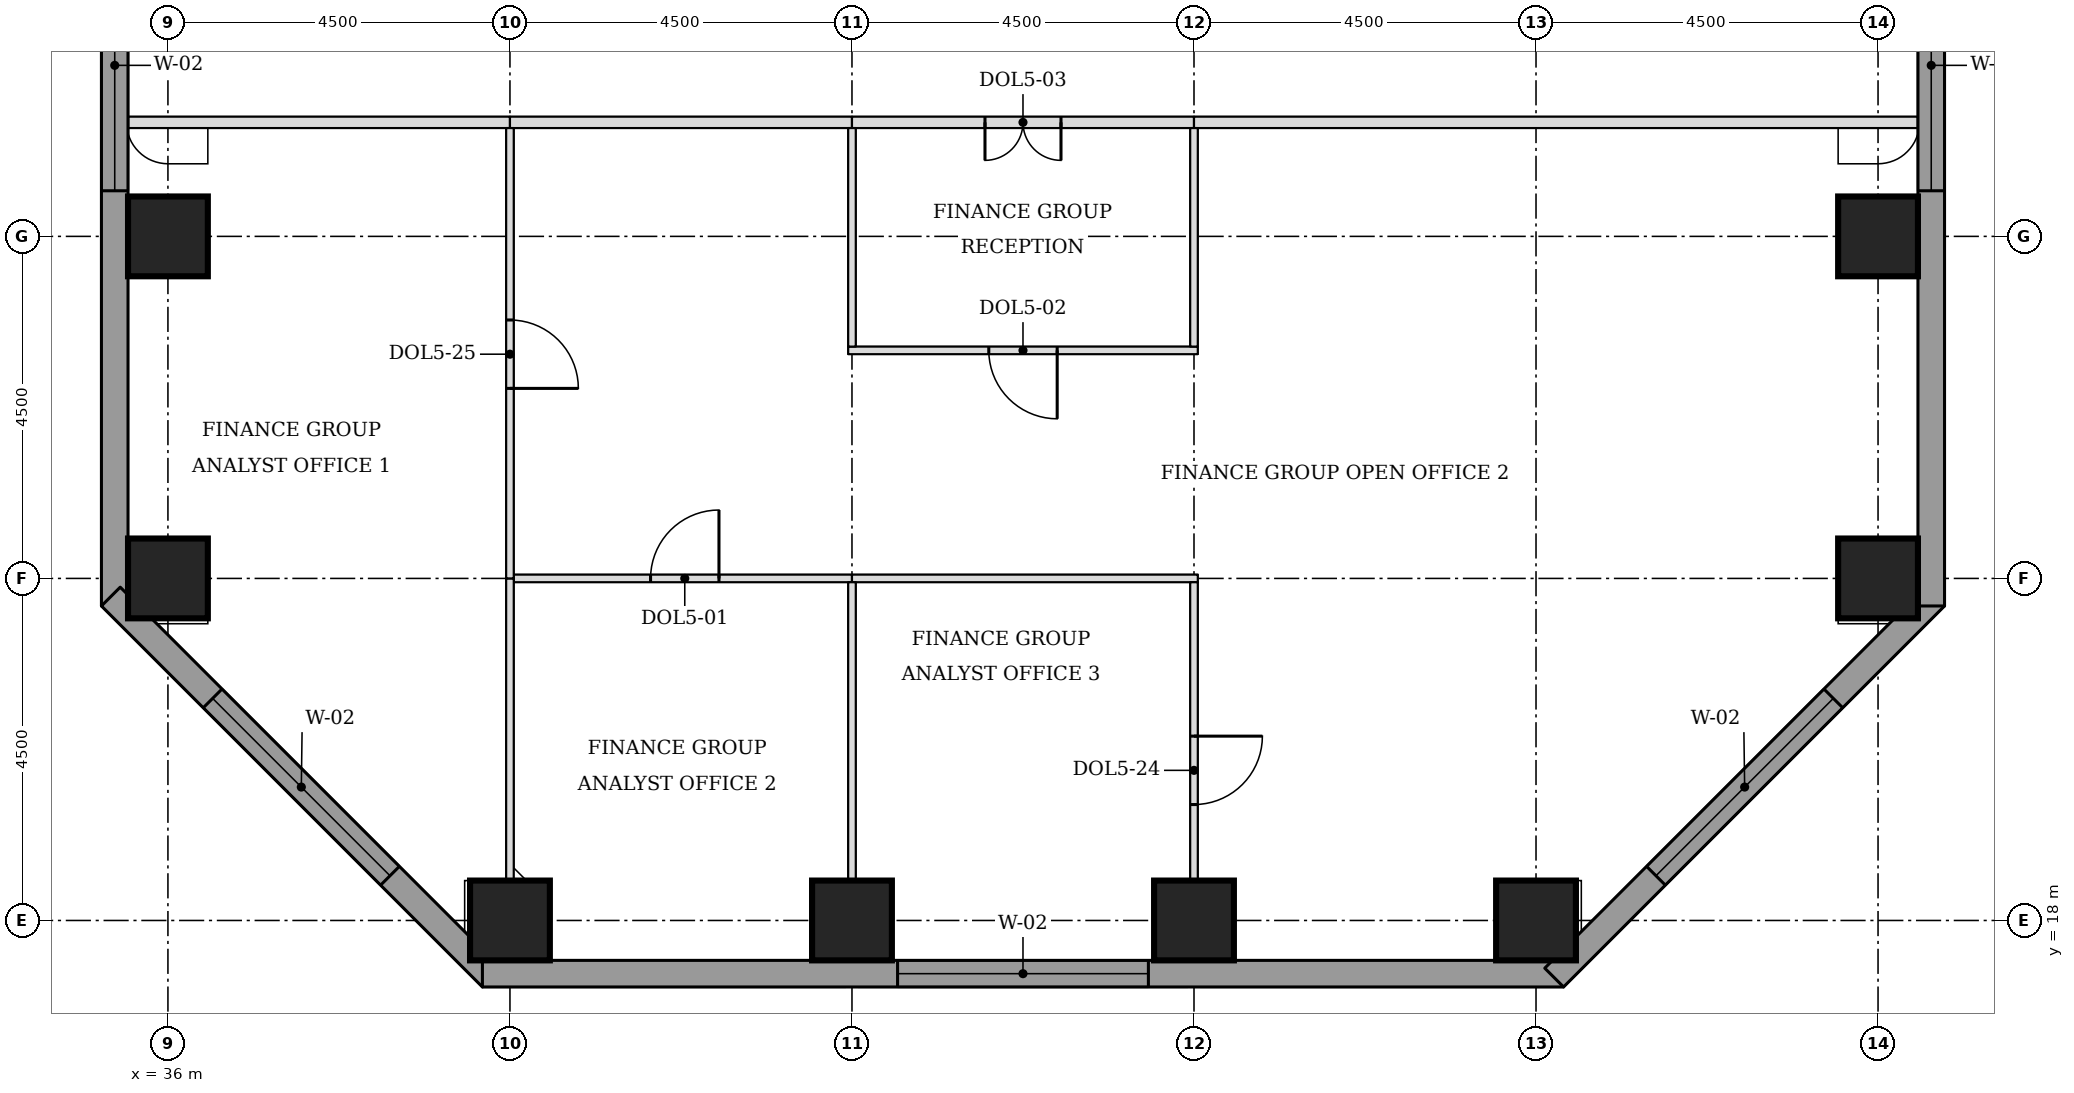
"""IFC4 building model, lengths in metres.
Left out: names, types, materials, properties, quantities, classifications, styles, units other than length and angle.
Written with IfcOpenShell. Run it as: python <this file> out.ifc"""

import sys

from ifc_helpers import new_model, si_unit, direction, frame, frame_2d, origin, origin_2d, place, context, subcontext, project, spatial, rectangle, extrude, element, fill, save


model = new_model("IFC4")
c1 = context("Model", 3, precision=1e-05, world=origin(), true_north=direction((0.0, 1.0)))
c2 = subcontext(c1, "Body", "Model", "MODEL_VIEW")
j1 = project(units=[si_unit("LENGTHUNIT", "METRE"), si_unit("PLANEANGLEUNIT", "RADIAN")], contexts=[c1])
p1 = place(None, origin())
s1 = spatial("IfcSite", under=j1, at=p1, CompositionType="ELEMENT")
p2 = place(p1, origin())
s2 = spatial("IfcBuilding", under=s1, at=p2, CompositionType="ELEMENT")
p3 = place(p2, frame((0.0, 0.0, 112.2)))
s3 = spatial("IfcBuildingStorey", under=s2, at=p3, CompositionType="ELEMENT", Elevation=112.2)
for number, where, z_axis, x_axis in (
    (1, (40.5, 18.0, 0.0), (0.0, 0.0, 1.0), (1.0, 0.0, 0.0)),
    (2, (45.0, 18.0, 0.0), (0.0, 0.0, 1.0), (1.0, 0.0, 0.0)),
    (3, (49.5, 18.0, 0.0), (0.0, 0.0, 1.0), (1.0, 0.0, 0.0)),
    (4, (54.0, 18.0, 0.0), (0.0, 0.0, 1.0), (1.0, 0.0, 0.0)),
    (5, (36.0, 22.5, 0.0), (0.0, 0.0, 1.0), (1.0, 0.0, 0.0)),
    (6, (58.5, 22.5, 0.0), (0.0, 0.0, 1.0), (1.0, 0.0, 0.0)),
    (7, (36.0, 27.0, 0.0), (0.0, 0.0, 1.0), (1.0, 0.0, 0.0)),
    (8, (58.5, 27.0, 0.0), (0.0, 0.0, 1.0), (1.0, 0.0, 0.0)),
):
    element("IfcColumn", number, at=place(p3, frame(where, z_axis=z_axis, x_axis=x_axis)), inside=s3, PredefinedType="COLUMN", context=c2, shape_type="SweptSolid", body=[
        extrude(rectangle(XDim=1.05, YDim=1.05, at=origin_2d()), origin(), (0.0, 0.0, 1.0), 3.7),
    ])
p4 = place(p3, frame((35.3, 39.975, 0.0), z_axis=(0.0, 0.0, 1.0), x_axis=(0.0, -1.0, 0.0)))
e9 = element("IfcWall", 9, at=p4, inside=s3, PredefinedType="STANDARD", context=c2, shape_type="SweptSolid", body=[
    extrude(rectangle(XDim=17.837, YDim=0.35, at=frame_2d((8.919, 0.0))), origin(), (0.0, 0.0, 1.0), 3.525),
])
p5 = place(p4, frame((0.5, 0.0, 0.9)))
e10 = element("IfcOpeningElement", 10, at=p5, cuts=e9, PredefinedType="OPENING", context=c2, shape_type="SweptSolid", body=[
    extrude(rectangle(XDim=3.3, YDim=1.9, at=frame_2d((1.65, 0.95))), frame((0.0, 0.185, 0.0), z_axis=(0.0, -1.0, 0.0), x_axis=(1.0, 0.0, 0.0)), (0.0, 0.0, 1.0), 0.37),
])
p6 = place(p4, frame((9.075, 0.0, 0.9)))
e11 = element("IfcOpeningElement", 11, at=p6, cuts=e9, PredefinedType="OPENING", context=c2, shape_type="SweptSolid", body=[
    extrude(rectangle(XDim=3.3, YDim=1.9, at=frame_2d((1.65, 0.95))), frame((0.0, 0.185, 0.0), z_axis=(0.0, -1.0, 0.0), x_axis=(1.0, 0.0, 0.0)), (0.0, 0.0, 1.0), 0.37),
])
p7 = place(p3, frame((35.249, 22.261, 0.0), z_axis=(0.0, 0.0, 1.0), x_axis=(0.707106781187, -0.707106781187, 0.0)))
e12 = element("IfcWall", 12, at=p7, inside=s3, PredefinedType="STANDARD", context=c2, shape_type="SweptSolid", body=[
    extrude(rectangle(XDim=7.089, YDim=0.35, at=frame_2d((3.544, 0.0))), origin(), (0.0, 0.0, 1.0), 3.525),
])
p8 = place(p7, frame((1.894, 0.0, 0.9)))
e13 = element("IfcOpeningElement", 13, at=p8, cuts=e12, PredefinedType="OPENING", context=c2, shape_type="SweptSolid", body=[
    extrude(rectangle(XDim=3.3, YDim=1.9, at=frame_2d((1.65, 0.95))), frame((0.0, 0.185, 0.0), z_axis=(0.0, -1.0, 0.0), x_axis=(1.0, 0.0, 0.0)), (0.0, 0.0, 1.0), 0.37),
])
p9 = place(p3, frame((40.138, 17.3, 0.0), z_axis=(0.0, 0.0, 1.0), x_axis=(1.0, 0.0, 0.0)))
e14 = element("IfcWall", 14, at=p9, inside=s3, PredefinedType="STANDARD", context=c2, shape_type="SweptSolid", body=[
    extrude(rectangle(XDim=14.225, YDim=0.35, at=frame_2d((7.112, 0.0))), origin(), (0.0, 0.0, 1.0), 3.525),
])
p10 = place(p9, frame((5.462, 0.0, 0.9)))
e15 = element("IfcOpeningElement", 15, at=p10, cuts=e14, PredefinedType="OPENING", context=c2, shape_type="SweptSolid", body=[
    extrude(rectangle(XDim=3.3, YDim=1.9, at=frame_2d((1.65, 0.95))), frame((0.0, 0.185, 0.0), z_axis=(0.0, -1.0, 0.0), x_axis=(1.0, 0.0, 0.0)), (0.0, 0.0, 1.0), 0.37),
])
p11 = place(p3, frame((54.239, 17.249, 0.0), z_axis=(0.0, 0.0, 1.0), x_axis=(0.707106781187, 0.707106781187, 0.0)))
e16 = element("IfcWall", 16, at=p11, inside=s3, PredefinedType="STANDARD", context=c2, shape_type="SweptSolid", body=[
    extrude(rectangle(XDim=7.089, YDim=0.35, at=frame_2d((3.544, 0.0))), origin(), (0.0, 0.0, 1.0), 3.525),
])
p12 = place(p11, frame((1.894, 0.0, 0.9)))
e17 = element("IfcOpeningElement", 17, at=p12, cuts=e16, PredefinedType="OPENING", context=c2, shape_type="SweptSolid", body=[
    extrude(rectangle(XDim=3.3, YDim=1.9, at=frame_2d((1.65, 0.95))), frame((0.0, 0.185, 0.0), z_axis=(0.0, -1.0, 0.0), x_axis=(1.0, 0.0, 0.0)), (0.0, 0.0, 1.0), 0.37),
])
p13 = place(p3, frame((59.2, 22.138, 0.0), z_axis=(0.0, 0.0, 1.0), x_axis=(0.0, 1.0, 0.0)))
e18 = element("IfcWall", 18, at=p13, inside=s3, PredefinedType="STANDARD", context=c2, shape_type="SweptSolid", body=[
    extrude(rectangle(XDim=17.837, YDim=0.35, at=frame_2d((8.919, 0.0))), origin(), (0.0, 0.0, 1.0), 3.525),
])
p14 = place(p13, frame((5.462, 0.0, 0.9)))
e19 = element("IfcOpeningElement", 19, at=p14, cuts=e18, PredefinedType="OPENING", context=c2, shape_type="SweptSolid", body=[
    extrude(rectangle(XDim=3.3, YDim=1.9, at=frame_2d((1.65, 0.95))), frame((0.0, 0.185, 0.0), z_axis=(0.0, -1.0, 0.0), x_axis=(1.0, 0.0, 0.0)), (0.0, 0.0, 1.0), 0.37),
])
p15 = place(p13, frame((14.037, 0.0, 0.9)))
e20 = element("IfcOpeningElement", 20, at=p15, cuts=e18, PredefinedType="OPENING", context=c2, shape_type="SweptSolid", body=[
    extrude(rectangle(XDim=3.3, YDim=1.9, at=frame_2d((1.65, 0.95))), frame((0.0, 0.185, 0.0), z_axis=(0.0, -1.0, 0.0), x_axis=(1.0, 0.0, 0.0)), (0.0, 0.0, 1.0), 0.37),
])
p16 = place(p3, frame((40.55, 22.5, 0.0), z_axis=(0.0, 0.0, 1.0), x_axis=(1.0, 0.0, 0.0)))
e21 = element("IfcWall", 21, at=p16, inside=s3, PredefinedType="PARTITIONING", context=c2, shape_type="SweptSolid", body=[
    extrude(rectangle(XDim=4.45, YDim=0.1, at=frame_2d((2.225, 0.0))), origin(), (0.0, 0.0, 1.0), 2.55),
])
p17 = place(p16, frame((1.8, 0.0, 0.0)))
e22 = element("IfcOpeningElement", 22, at=p17, cuts=e21, PredefinedType="OPENING", context=c2, shape_type="SweptSolid", body=[
    extrude(rectangle(XDim=0.9, YDim=2.1, at=frame_2d((0.45, 1.05))), frame((0.0, 0.06, 0.0), z_axis=(0.0, -1.0, 0.0), x_axis=(1.0, 0.0, 0.0)), (0.0, 0.0, 1.0), 0.12),
])
p18 = place(p3, frame((45.0, 22.5, 0.0), z_axis=(0.0, 0.0, 1.0), x_axis=(1.0, 0.0, 0.0)))
e23 = element("IfcWall", 23, at=p18, inside=s3, PredefinedType="PARTITIONING", context=c2, shape_type="SweptSolid", body=[
    extrude(rectangle(XDim=4.55, YDim=0.1, at=frame_2d((2.275, 0.0))), origin(), (0.0, 0.0, 1.0), 2.55),
])
p19 = place(p3, frame((44.95, 25.5, 0.0), z_axis=(0.0, 0.0, 1.0), x_axis=(1.0, 0.0, 0.0)))
e24 = element("IfcWall", 24, at=p19, inside=s3, PredefinedType="PARTITIONING", context=c2, shape_type="SweptSolid", body=[
    extrude(rectangle(XDim=4.6, YDim=0.1, at=frame_2d((2.3, 0.0))), origin(), (0.0, 0.0, 1.0), 3.55),
])
p20 = place(p19, frame((1.85, 0.0, 0.0)))
e25 = element("IfcOpeningElement", 25, at=p20, cuts=e24, PredefinedType="OPENING", context=c2, shape_type="SweptSolid", body=[
    extrude(rectangle(XDim=0.9, YDim=2.1, at=frame_2d((0.45, 1.05))), frame((0.0, 0.06, 0.0), z_axis=(0.0, -1.0, 0.0), x_axis=(1.0, 0.0, 0.0)), (0.0, 0.0, 1.0), 0.12),
])
p21 = place(p3, frame((35.475, 28.5, 0.0), z_axis=(0.0, 0.0, 1.0), x_axis=(1.0, 0.0, 0.0)))
e26 = element("IfcWall", 26, at=p21, inside=s3, PredefinedType="PARTITIONING", context=c2, shape_type="SweptSolid", body=[
    extrude(rectangle(XDim=5.025, YDim=0.15, at=frame_2d((2.512, 0.0))), origin(), (0.0, 0.0, 1.0), 3.55),
])
p22 = place(p3, frame((40.5, 28.5, 0.0), z_axis=(0.0, 0.0, 1.0), x_axis=(1.0, 0.0, 0.0)))
e27 = element("IfcWall", 27, at=p22, inside=s3, PredefinedType="PARTITIONING", context=c2, shape_type="SweptSolid", body=[
    extrude(rectangle(XDim=4.5, YDim=0.15, at=frame_2d((2.25, 0.0))), origin(), (0.0, 0.0, 1.0), 3.55),
])
p23 = place(p3, frame((45.0, 28.5, 0.0), z_axis=(0.0, 0.0, 1.0), x_axis=(1.0, 0.0, 0.0)))
e28 = element("IfcWall", 28, at=p23, inside=s3, PredefinedType="PARTITIONING", context=c2, shape_type="SweptSolid", body=[
    extrude(rectangle(XDim=4.5, YDim=0.15, at=frame_2d((2.25, 0.0))), origin(), (0.0, 0.0, 1.0), 3.55),
])
p24 = place(p23, frame((1.75, 0.0, 0.0)))
e29 = element("IfcOpeningElement", 29, at=p24, cuts=e28, PredefinedType="OPENING", context=c2, shape_type="SweptSolid", body=[
    extrude(rectangle(XDim=1.0, YDim=2.1, at=frame_2d((0.5, 1.05))), frame((0.0, 0.085, 0.0), z_axis=(0.0, -1.0, 0.0), x_axis=(1.0, 0.0, 0.0)), (0.0, 0.0, 1.0), 0.17),
])
p25 = place(p3, frame((49.5, 28.5, 0.0), z_axis=(0.0, 0.0, 1.0), x_axis=(1.0, 0.0, 0.0)))
e30 = element("IfcWall", 30, at=p25, inside=s3, PredefinedType="PARTITIONING", context=c2, shape_type="SweptSolid", body=[
    extrude(rectangle(XDim=9.525, YDim=0.15, at=frame_2d((4.762, 0.0))), origin(), (0.0, 0.0, 1.0), 3.55),
])
p26 = place(p3, frame((45.0, 17.475, 0.0), z_axis=(0.0, 0.0, 1.0), x_axis=(0.0, 1.0, 0.0)))
e31 = element("IfcWall", 31, at=p26, inside=s3, PredefinedType="PARTITIONING", context=c2, shape_type="SweptSolid", body=[
    extrude(rectangle(XDim=4.975, YDim=0.1, at=frame_2d((2.487, 0.0))), origin(), (0.0, 0.0, 1.0), 3.55),
])
p27 = place(p3, frame((49.5, 17.475, 0.0), z_axis=(0.0, 0.0, 1.0), x_axis=(0.0, 1.0, 0.0)))
e32 = element("IfcWall", 32, at=p27, inside=s3, PredefinedType="PARTITIONING", context=c2, shape_type="SweptSolid", body=[
    extrude(rectangle(XDim=4.975, YDim=0.1, at=frame_2d((2.487, 0.0))), origin(), (0.0, 0.0, 1.0), 3.55),
])
p28 = place(p27, frame((2.05, 0.0, 0.0)))
e33 = element("IfcOpeningElement", 33, at=p28, cuts=e32, PredefinedType="OPENING", context=c2, shape_type="SweptSolid", body=[
    extrude(rectangle(XDim=0.9, YDim=2.1, at=frame_2d((0.45, 1.05))), frame((0.0, 0.06, 0.0), z_axis=(0.0, -1.0, 0.0), x_axis=(1.0, 0.0, 0.0)), (0.0, 0.0, 1.0), 0.12),
])
p29 = place(p3, frame((40.5, 18.525, 0.0), z_axis=(0.0, 0.0, 1.0), x_axis=(0.0, 1.0, 0.0)))
e34 = element("IfcWall", 34, at=p29, inside=s3, PredefinedType="PARTITIONING", context=c2, shape_type="SweptSolid", body=[
    extrude(rectangle(XDim=3.975, YDim=0.1, at=frame_2d((1.988, 0.0))), origin(), (0.0, 0.0, 1.0), 3.55),
])
p30 = place(p3, frame((40.5, 22.5, 0.0), z_axis=(0.0, 0.0, 1.0), x_axis=(0.0, 1.0, 0.0)))
e35 = element("IfcWall", 35, at=p30, inside=s3, PredefinedType="PARTITIONING", context=c2, shape_type="SweptSolid", body=[
    extrude(rectangle(XDim=5.925, YDim=0.1, at=frame_2d((2.962, 0.0))), origin(), (0.0, 0.0, 1.0), 3.55),
])
p31 = place(p30, frame((2.5, 0.0, 0.0)))
e36 = element("IfcOpeningElement", 36, at=p31, cuts=e35, PredefinedType="OPENING", context=c2, shape_type="SweptSolid", body=[
    extrude(rectangle(XDim=0.9, YDim=2.1, at=frame_2d((0.45, 1.05))), frame((0.0, 0.06, 0.0), z_axis=(0.0, -1.0, 0.0), x_axis=(1.0, 0.0, 0.0)), (0.0, 0.0, 1.0), 0.12),
])
for number, where, z_axis, x_axis in (
    (37, (45.0, 25.55, 0.0), (0.0, 0.0, 1.0), (0.0, 1.0, 0.0)),
    (38, (49.5, 25.55, 0.0), (0.0, 0.0, 1.0), (0.0, 1.0, 0.0)),
):
    element("IfcWall", number, at=place(p3, frame(where, z_axis=z_axis, x_axis=x_axis)), inside=s3, PredefinedType="PARTITIONING", context=c2, shape_type="SweptSolid", body=[
        extrude(rectangle(XDim=2.875, YDim=0.1, at=frame_2d((1.438, 0.0))), origin(), (0.0, 0.0, 1.0), 3.55),
    ])
p32 = place(p6, origin())
e39 = element("IfcWindow", 39, at=p32, inside=s3, PartitioningType="SINGLE_PANEL", PredefinedType="WINDOW", context=c2, shape_type="SweptSolid", body=[
    extrude(rectangle(XDim=3.3, YDim=1.9, at=frame_2d((1.65, 0.95))), frame((0.0, 0.085, 0.0), z_axis=(0.0, -1.0, 0.0), x_axis=(1.0, 0.0, 0.0)), (0.0, 0.0, 1.0), 0.06),
])
fill(e11, e39)
p33 = place(p8, origin())
e40 = element("IfcWindow", 40, at=p33, inside=s3, PartitioningType="SINGLE_PANEL", PredefinedType="WINDOW", context=c2, shape_type="SweptSolid", body=[
    extrude(rectangle(XDim=3.3, YDim=1.9, at=frame_2d((1.65, 0.95))), frame((0.0, 0.085, 0.0), z_axis=(0.0, -1.0, 0.0), x_axis=(1.0, 0.0, 0.0)), (0.0, 0.0, 1.0), 0.06),
])
fill(e13, e40)
p34 = place(p10, origin())
e41 = element("IfcWindow", 41, at=p34, inside=s3, PartitioningType="SINGLE_PANEL", PredefinedType="WINDOW", context=c2, shape_type="SweptSolid", body=[
    extrude(rectangle(XDim=3.3, YDim=1.9, at=frame_2d((1.65, 0.95))), frame((0.0, 0.085, 0.0), z_axis=(0.0, -1.0, 0.0), x_axis=(1.0, 0.0, 0.0)), (0.0, 0.0, 1.0), 0.06),
])
fill(e15, e41)
p35 = place(p12, origin())
e42 = element("IfcWindow", 42, at=p35, inside=s3, PartitioningType="SINGLE_PANEL", PredefinedType="WINDOW", context=c2, shape_type="SweptSolid", body=[
    extrude(rectangle(XDim=3.3, YDim=1.9, at=frame_2d((1.65, 0.95))), frame((0.0, 0.085, 0.0), z_axis=(0.0, -1.0, 0.0), x_axis=(1.0, 0.0, 0.0)), (0.0, 0.0, 1.0), 0.06),
])
fill(e17, e42)
p36 = place(p14, origin())
e43 = element("IfcWindow", 43, at=p36, inside=s3, PartitioningType="SINGLE_PANEL", PredefinedType="WINDOW", context=c2, shape_type="SweptSolid", body=[
    extrude(rectangle(XDim=3.3, YDim=1.9, at=frame_2d((1.65, 0.95))), frame((0.0, 0.085, 0.0), z_axis=(0.0, -1.0, 0.0), x_axis=(1.0, 0.0, 0.0)), (0.0, 0.0, 1.0), 0.06),
])
fill(e19, e43)
p37 = place(p24, frame((1.0, 0.0, 0.0), z_axis=(0.0, 0.0, 1.0), x_axis=(-1.0, 0.0, 0.0)))
e44 = element("IfcDoor", 44, at=p37, inside=s3, OperationType="DOUBLE_DOOR_SINGLE_SWING", PredefinedType="DOOR", context=c2, shape_type="SweptSolid", body=[
    extrude(rectangle(XDim=1.0, YDim=2.1, at=frame_2d((0.5, 1.05))), frame((0.0, 0.025, 0.0), z_axis=(0.0, -1.0, 0.0), x_axis=(1.0, 0.0, 0.0)), (0.0, 0.0, 1.0), 0.05),
])
fill(e29, e44)
p38 = place(p20, frame((0.9, 0.0, 0.0), z_axis=(0.0, 0.0, 1.0), x_axis=(-1.0, 0.0, 0.0)))
e45 = element("IfcDoor", 45, at=p38, inside=s3, OperationType="SINGLE_SWING_LEFT", PredefinedType="DOOR", context=c2, shape_type="SweptSolid", body=[
    extrude(rectangle(XDim=0.9, YDim=2.1, at=frame_2d((0.45, 1.05))), frame((0.0, 0.025, 0.0), z_axis=(0.0, -1.0, 0.0), x_axis=(1.0, 0.0, 0.0)), (0.0, 0.0, 1.0), 0.05),
])
fill(e25, e45)
p39 = place(p31, frame((0.9, 0.0, 0.0), z_axis=(0.0, 0.0, 1.0), x_axis=(-1.0, 0.0, 0.0)))
e46 = element("IfcDoor", 46, at=p39, inside=s3, OperationType="SINGLE_SWING_RIGHT", PredefinedType="DOOR", context=c2, shape_type="SweptSolid", body=[
    extrude(rectangle(XDim=0.9, YDim=2.1, at=frame_2d((0.45, 1.05))), frame((0.0, 0.025, 0.0), z_axis=(0.0, -1.0, 0.0), x_axis=(1.0, 0.0, 0.0)), (0.0, 0.0, 1.0), 0.05),
])
fill(e36, e46)
p40 = place(p17, origin())
e47 = element("IfcDoor", 47, at=p40, inside=s3, OperationType="SINGLE_SWING_RIGHT", PredefinedType="DOOR", context=c2, shape_type="SweptSolid", body=[
    extrude(rectangle(XDim=0.9, YDim=2.1, at=frame_2d((0.45, 1.05))), frame((0.0, 0.025, 0.0), z_axis=(0.0, -1.0, 0.0), x_axis=(1.0, 0.0, 0.0)), (0.0, 0.0, 1.0), 0.05),
])
fill(e22, e47)
p41 = place(p28, frame((0.9, 0.0, 0.0), z_axis=(0.0, 0.0, 1.0), x_axis=(-1.0, 0.0, 0.0)))
e48 = element("IfcDoor", 48, at=p41, inside=s3, OperationType="SINGLE_SWING_LEFT", PredefinedType="DOOR", context=c2, shape_type="SweptSolid", body=[
    extrude(rectangle(XDim=0.9, YDim=2.1, at=frame_2d((0.45, 1.05))), frame((0.0, 0.025, 0.0), z_axis=(0.0, -1.0, 0.0), x_axis=(1.0, 0.0, 0.0)), (0.0, 0.0, 1.0), 0.05),
])
fill(e33, e48)
save(model, sys.argv[1])
